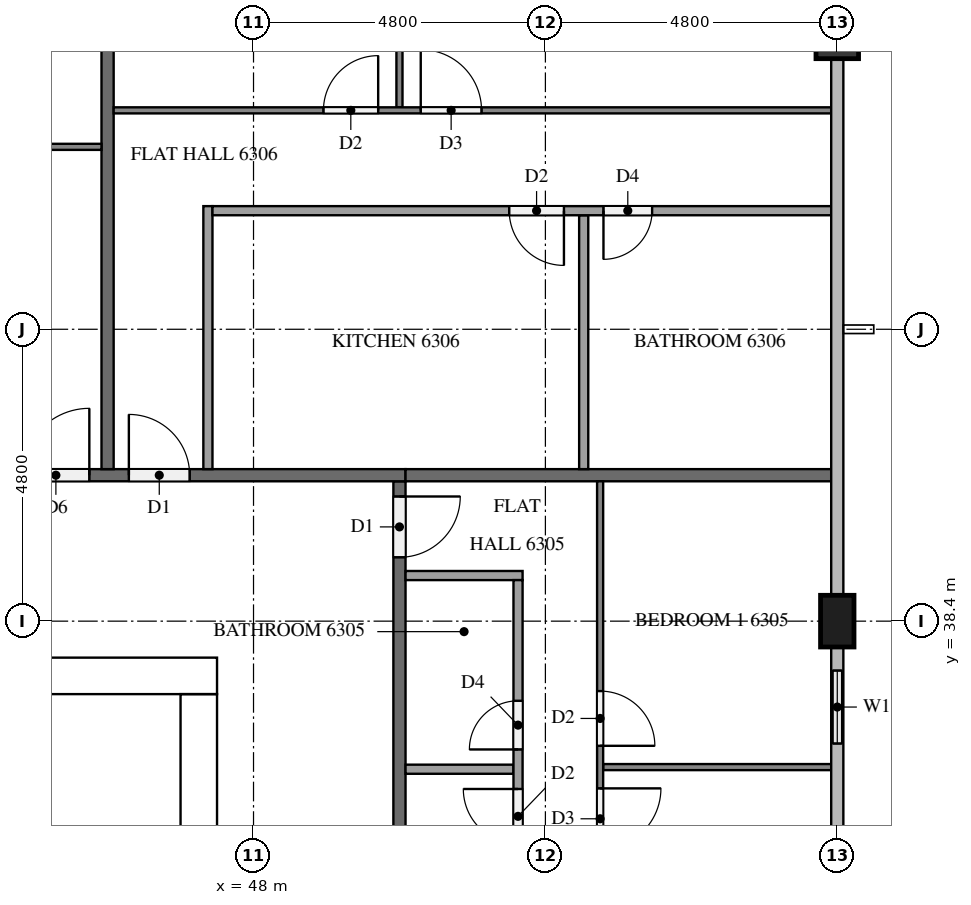
"""IFC4 building model, lengths in metres.
Left out: names, types, materials, properties, quantities, classifications, styles, units other than length and angle.
Written with IfcOpenShell. Run it as: python <this file> out.ifc"""

import sys

from ifc_helpers import new_model, si_unit, direction, frame, frame_2d, origin, origin_2d, place, context, subcontext, project, spatial, rectangle, extrude, element, fill, save


model = new_model("IFC4")
c1 = context("Model", 3, precision=1e-05, world=origin(), true_north=direction((0.0, 1.0)))
c2 = subcontext(c1, "Body", "Model", "MODEL_VIEW")
j1 = project(units=[si_unit("LENGTHUNIT", "METRE"), si_unit("PLANEANGLEUNIT", "RADIAN")], contexts=[c1])
p1 = place(None, origin())
s1 = spatial("IfcSite", under=j1, at=p1, CompositionType="ELEMENT")
p2 = place(p1, origin())
s2 = spatial("IfcBuilding", under=s1, at=p2, CompositionType="ELEMENT")
p3 = place(p2, frame((0.0, 0.0, 242.2)))
s3 = spatial("IfcBuildingStorey", under=s2, at=p3, CompositionType="ELEMENT", Elevation=242.2)
p4 = place(p3, frame((15.0, 37.5, 0.0), z_axis=(0.0, 0.0, 1.0), x_axis=(1.0, 0.0, 0.0)))
e1 = element("IfcWall", 1, at=p4, inside=s3, PredefinedType="SHEAR", context=c2, shape_type="SweptSolid", body=[
    extrude(rectangle(XDim=32.4, YDim=0.6, at=frame_2d((16.2, 0.0))), origin(), (0.0, 0.0, 1.0), 3.2),
])
p5 = place(p4, frame((15.3, 0.0, 0.0)))
e2 = element("IfcOpeningElement", 2, at=p5, cuts=e1, PredefinedType="OPENING", context=c2, shape_type="SweptSolid", body=[
    extrude(rectangle(XDim=1.8, YDim=2.1, at=frame_2d((0.9, 1.05))), frame((0.0, 0.31, 0.0), z_axis=(0.0, -1.0, 0.0), x_axis=(1.0, 0.0, 0.0)), (0.0, 0.0, 1.0), 0.62),
])
p6 = place(p4, frame((1.25, 0.0, 0.0)))
e3 = element("IfcOpeningElement", 3, at=p6, cuts=e1, PredefinedType="OPENING", context=c2, shape_type="SweptSolid", body=[
    extrude(rectangle(XDim=1.0, YDim=2.1, at=frame_2d((0.5, 1.05))), frame((0.0, 0.31, 0.0), z_axis=(0.0, -1.0, 0.0), x_axis=(1.0, 0.0, 0.0)), (0.0, 0.0, 1.0), 0.62),
])
p7 = place(p4, frame((4.988, 0.0, 0.0)))
e4 = element("IfcOpeningElement", 4, at=p7, cuts=e1, PredefinedType="OPENING", context=c2, shape_type="SweptSolid", body=[
    extrude(rectangle(XDim=1.0, YDim=2.1, at=frame_2d((0.5, 1.05))), frame((0.0, 0.31, 0.0), z_axis=(0.0, -1.0, 0.0), x_axis=(1.0, 0.0, 0.0)), (0.0, 0.0, 1.0), 0.62),
])
p8 = place(p3, frame((47.1, 15.6, 0.0), z_axis=(0.0, 0.0, 1.0), x_axis=(0.0, 1.0, 0.0)))
e5 = element("IfcWall", 5, at=p8, inside=s3, PredefinedType="SHEAR", context=c2, shape_type="SweptSolid", body=[
    extrude(rectangle(XDim=21.6, YDim=0.6, at=frame_2d((10.8, 0.0))), origin(), (0.0, 0.0, 1.0), 3.2),
])
p9 = place(p8, frame((10.5, 0.0, 0.0)))
e6 = element("IfcOpeningElement", 6, at=p9, cuts=e5, PredefinedType="OPENING", context=c2, shape_type="SweptSolid", body=[
    extrude(rectangle(XDim=1.2, YDim=2.1, at=frame_2d((0.6, 1.05))), frame((0.0, 0.31, 0.0), z_axis=(0.0, -1.0, 0.0), x_axis=(1.0, 0.0, 0.0)), (0.0, 0.0, 1.0), 0.62),
])
p10 = place(p3, frame((57.6, 38.4, 0.0), z_axis=(0.0, 0.0, 1.0), x_axis=(0.0, 1.0, 0.0)))
e7 = element("IfcColumn", 7, at=p10, inside=s3, PredefinedType="COLUMN", context=c2, shape_type="SweptSolid", body=[
    extrude(rectangle(XDim=0.85, YDim=0.55, at=origin_2d()), origin(), (0.0, 0.0, 1.0), 3.2),
])
p11 = place(p3, frame((57.6, 48.0, 0.0), z_axis=(0.0, 0.0, 1.0), x_axis=(1.0, 0.0, 0.0)))
e8 = element("IfcColumn", 8, at=p11, inside=s3, PredefinedType="COLUMN", context=c2, shape_type="SweptSolid", body=[
    extrude(rectangle(XDim=0.7, YDim=0.7, at=origin_2d()), origin(), (0.0, 0.0, 1.0), 3.2),
])
p12 = place(p3, frame((57.6, 36.0, 0.0), z_axis=(0.0, 0.0, 1.0), x_axis=(0.0, 1.0, 0.0)))
e9 = element("IfcWall", 9, at=p12, inside=s3, PredefinedType="SOLIDWALL", context=c2, shape_type="SweptSolid", body=[
    extrude(rectangle(XDim=1.975, YDim=0.15, at=frame_2d((0.988, 0.0))), origin(), (0.0, 0.0, 1.0), 3.2),
])
p13 = place(p12, frame((0.387, 0.0, 0.9)))
e10 = element("IfcOpeningElement", 10, at=p13, cuts=e9, PredefinedType="OPENING", context=c2, shape_type="SweptSolid", body=[
    extrude(rectangle(XDim=1.2, YDim=1.4, at=frame_2d((0.6, 0.7))), frame((0.0, 0.085, 0.0), z_axis=(0.0, -1.0, 0.0), x_axis=(1.0, 0.0, 0.0)), (0.0, 0.0, 1.0), 0.17),
])
p14 = place(p3, frame((50.4, 40.7, 0.0), z_axis=(0.0, 0.0, 1.0), x_axis=(0.0, -1.0, 0.0)))
e11 = element("IfcWall", 11, at=p14, inside=s3, PredefinedType="PARTITIONING", context=c2, shape_type="SweptSolid", body=[
    extrude(rectangle(XDim=28.6, YDim=0.2, at=frame_2d((14.3, 0.0))), origin(), (0.0, 0.0, 1.0), 3.2),
])
p15 = place(p14, frame((27.3, 0.0, 0.0)))
e12 = element("IfcOpeningElement", 12, at=p15, cuts=e11, PredefinedType="OPENING", context=c2, shape_type="SweptSolid", body=[
    extrude(rectangle(XDim=1.1, YDim=2.1, at=frame_2d((0.55, 1.05))), frame((0.0, 0.11, 0.0), z_axis=(0.0, -1.0, 0.0), x_axis=(1.0, 0.0, 0.0)), (0.0, 0.0, 1.0), 0.22),
])
p16 = place(p14, frame((0.25, 0.0, 0.0)))
e13 = element("IfcOpeningElement", 13, at=p16, cuts=e11, PredefinedType="OPENING", context=c2, shape_type="SweptSolid", body=[
    extrude(rectangle(XDim=1.0, YDim=2.1, at=frame_2d((0.5, 1.05))), frame((0.0, 0.11, 0.0), z_axis=(0.0, -1.0, 0.0), x_axis=(1.0, 0.0, 0.0)), (0.0, 0.0, 1.0), 0.22),
])
p17 = place(p3, frame((11.9, 40.8, 0.0), z_axis=(0.0, 0.0, 1.0), x_axis=(1.0, 0.0, 0.0)))
e14 = element("IfcWall", 14, at=p17, inside=s3, PredefinedType="PARTITIONING", context=c2, shape_type="SweptSolid", body=[
    extrude(rectangle(XDim=38.6, YDim=0.2, at=frame_2d((19.3, 0.0))), origin(), (0.0, 0.0, 1.0), 3.2),
])
p18 = place(p17, frame((34.05, 0.0, 0.0)))
e15 = element("IfcOpeningElement", 15, at=p18, cuts=e14, PredefinedType="OPENING", context=c2, shape_type="SweptSolid", body=[
    extrude(rectangle(XDim=1.0, YDim=2.1, at=frame_2d((0.5, 1.05))), frame((0.0, 0.11, 0.0), z_axis=(0.0, -1.0, 0.0), x_axis=(1.0, 0.0, 0.0)), (0.0, 0.0, 1.0), 0.22),
])
p19 = place(p17, frame((32.3, 0.0, 0.0)))
e16 = element("IfcOpeningElement", 16, at=p19, cuts=e14, PredefinedType="OPENING", context=c2, shape_type="SweptSolid", body=[
    extrude(rectangle(XDim=1.1, YDim=2.1, at=frame_2d((0.55, 1.05))), frame((0.0, 0.11, 0.0), z_axis=(0.0, -1.0, 0.0), x_axis=(1.0, 0.0, 0.0)), (0.0, 0.0, 1.0), 0.22),
])
p20 = place(p17, frame((2.85, 0.0, 0.0)))
e17 = element("IfcOpeningElement", 17, at=p20, cuts=e14, PredefinedType="OPENING", context=c2, shape_type="SweptSolid", body=[
    extrude(rectangle(XDim=1.0, YDim=2.1, at=frame_2d((0.5, 1.05))), frame((0.0, 0.11, 0.0), z_axis=(0.0, -1.0, 0.0), x_axis=(1.0, 0.0, 0.0)), (0.0, 0.0, 1.0), 0.22),
])
p21 = place(p17, frame((1.15, 0.0, 0.0)))
e18 = element("IfcOpeningElement", 18, at=p21, cuts=e14, PredefinedType="OPENING", context=c2, shape_type="SweptSolid", body=[
    extrude(rectangle(XDim=1.0, YDim=2.1, at=frame_2d((0.5, 1.05))), frame((0.0, 0.11, 0.0), z_axis=(0.0, -1.0, 0.0), x_axis=(1.0, 0.0, 0.0)), (0.0, 0.0, 1.0), 0.22),
])
p22 = place(p3, frame((50.5, 40.8, 0.0), z_axis=(0.0, 0.0, 1.0), x_axis=(1.0, 0.0, 0.0)))
e19 = element("IfcWall", 19, at=p22, inside=s3, PredefinedType="PARTITIONING", context=c2, shape_type="SweptSolid", body=[
    extrude(rectangle(XDim=7.0, YDim=0.2, at=frame_2d((3.5, 0.0))), origin(), (0.0, 0.0, 1.0), 3.2),
])
p23 = place(p3, frame((45.6, 52.7, 0.0), z_axis=(0.0, 0.0, 1.0), x_axis=(0.0, -1.0, 0.0)))
e20 = element("IfcWall", 20, at=p23, inside=s3, PredefinedType="PARTITIONING", context=c2, shape_type="SweptSolid", body=[
    extrude(rectangle(XDim=11.8, YDim=0.2, at=frame_2d((5.9, 0.0))), origin(), (0.0, 0.0, 1.0), 3.2),
])
p24 = place(p3, frame((53.75, 36.0, 0.0), z_axis=(0.0, 0.0, 1.0), x_axis=(1.0, 0.0, 0.0)))
e21 = element("IfcWall", 21, at=p24, inside=s3, PredefinedType="PARTITIONING", context=c2, shape_type="SweptSolid", body=[
    extrude(rectangle(XDim=3.75, YDim=0.1, at=frame_2d((1.875, 0.0))), origin(), (0.0, 0.0, 1.0), 3.2),
])
p25 = place(p3, frame((53.7, 40.7, 0.0), z_axis=(0.0, 0.0, 1.0), x_axis=(0.0, -1.0, 0.0)))
e22 = element("IfcWall", 22, at=p25, inside=s3, PredefinedType="PARTITIONING", context=c2, shape_type="SweptSolid", body=[
    extrude(rectangle(XDim=9.4, YDim=0.1, at=frame_2d((4.7, 0.0))), origin(), (0.0, 0.0, 1.0), 3.2),
])
p26 = place(p25, frame((3.45, 0.0, 0.0)))
e23 = element("IfcOpeningElement", 23, at=p26, cuts=e22, PredefinedType="OPENING", context=c2, shape_type="SweptSolid", body=[
    extrude(rectangle(XDim=0.9, YDim=2.1, at=frame_2d((0.45, 1.05))), frame((0.0, 0.06, 0.0), z_axis=(0.0, -1.0, 0.0), x_axis=(1.0, 0.0, 0.0)), (0.0, 0.0, 1.0), 0.12),
])
p27 = place(p25, frame((5.05, 0.0, 0.0)))
e24 = element("IfcOpeningElement", 24, at=p27, cuts=e22, PredefinedType="OPENING", context=c2, shape_type="SweptSolid", body=[
    extrude(rectangle(XDim=1.0, YDim=2.1, at=frame_2d((0.5, 1.05))), frame((0.0, 0.06, 0.0), z_axis=(0.0, -1.0, 0.0), x_axis=(1.0, 0.0, 0.0)), (0.0, 0.0, 1.0), 0.12),
])
p28 = place(p3, frame((50.5, 35.965, 0.0), z_axis=(0.0, 0.0, 1.0), x_axis=(1.0, 0.0, 0.0)))
e25 = element("IfcWall", 25, at=p28, inside=s3, PredefinedType="PARTITIONING", context=c2, shape_type="SweptSolid", body=[
    extrude(rectangle(XDim=1.775, YDim=0.15, at=frame_2d((0.887, 0.0))), origin(), (0.0, 0.0, 1.0), 3.2),
])
p29 = place(p3, frame((50.5, 39.15, 0.0), z_axis=(0.0, 0.0, 1.0), x_axis=(1.0, 0.0, 0.0)))
e26 = element("IfcWall", 26, at=p29, inside=s3, PredefinedType="PARTITIONING", context=c2, shape_type="SweptSolid", body=[
    extrude(rectangle(XDim=1.925, YDim=0.15, at=frame_2d((0.962, 0.0))), origin(), (0.0, 0.0, 1.0), 3.2),
])
p30 = place(p3, frame((52.35, 31.3, 0.0), z_axis=(0.0, 0.0, 1.0), x_axis=(0.0, 1.0, 0.0)))
e27 = element("IfcWall", 27, at=p30, inside=s3, PredefinedType="PARTITIONING", context=c2, shape_type="SweptSolid", body=[
    extrude(rectangle(XDim=7.775, YDim=0.15, at=frame_2d((3.887, 0.0))), origin(), (0.0, 0.0, 1.0), 3.2),
])
p31 = place(p30, frame((4.99, 0.0, 0.0)))
e28 = element("IfcOpeningElement", 28, at=p31, cuts=e27, PredefinedType="OPENING", context=c2, shape_type="SweptSolid", body=[
    extrude(rectangle(XDim=0.8, YDim=2.1, at=frame_2d((0.4, 1.05))), frame((0.0, 0.085, 0.0), z_axis=(0.0, -1.0, 0.0), x_axis=(1.0, 0.0, 0.0)), (0.0, 0.0, 1.0), 0.17),
])
p32 = place(p30, frame((3.44, 0.0, 0.0)))
e29 = element("IfcOpeningElement", 29, at=p32, cuts=e27, PredefinedType="OPENING", context=c2, shape_type="SweptSolid", body=[
    extrude(rectangle(XDim=0.9, YDim=2.1, at=frame_2d((0.45, 1.05))), frame((0.0, 0.085, 0.0), z_axis=(0.0, -1.0, 0.0), x_axis=(1.0, 0.0, 0.0)), (0.0, 0.0, 1.0), 0.17),
])
p33 = place(p3, frame((50.4, 46.85, 0.0), z_axis=(0.0, 0.0, 1.0), x_axis=(0.0, 1.0, 0.0)))
e30 = element("IfcWall", 30, at=p33, inside=s3, PredefinedType="PARTITIONING", context=c2, shape_type="SweptSolid", body=[
    extrude(rectangle(XDim=5.85, YDim=0.1, at=frame_2d((2.925, 0.0))), origin(), (0.0, 0.0, 1.0), 3.2),
])
p34 = place(p3, frame((45.7, 46.8, 0.0), z_axis=(0.0, 0.0, 1.0), x_axis=(1.0, 0.0, 0.0)))
e31 = element("IfcWall", 31, at=p34, inside=s3, PredefinedType="PARTITIONING", context=c2, shape_type="SweptSolid", body=[
    extrude(rectangle(XDim=11.8, YDim=0.1, at=frame_2d((5.9, 0.0))), origin(), (0.0, 0.0, 1.0), 3.2),
])
p35 = place(p34, frame((3.45, 0.0, 0.0)))
e32 = element("IfcOpeningElement", 32, at=p35, cuts=e31, PredefinedType="OPENING", context=c2, shape_type="SweptSolid", body=[
    extrude(rectangle(XDim=0.9, YDim=2.1, at=frame_2d((0.45, 1.05))), frame((0.0, 0.06, 0.0), z_axis=(0.0, -1.0, 0.0), x_axis=(1.0, 0.0, 0.0)), (0.0, 0.0, 1.0), 0.12),
])
p36 = place(p34, frame((5.05, 0.0, 0.0)))
e33 = element("IfcOpeningElement", 33, at=p36, cuts=e31, PredefinedType="OPENING", context=c2, shape_type="SweptSolid", body=[
    extrude(rectangle(XDim=1.0, YDim=2.1, at=frame_2d((0.5, 1.05))), frame((0.0, 0.06, 0.0), z_axis=(0.0, -1.0, 0.0), x_axis=(1.0, 0.0, 0.0)), (0.0, 0.0, 1.0), 0.12),
])
p37 = place(p3, frame((53.43, 40.9, 0.0), z_axis=(0.0, 0.0, 1.0), x_axis=(0.0, 1.0, 0.0)))
e34 = element("IfcWall", 34, at=p37, inside=s3, PredefinedType="PARTITIONING", context=c2, shape_type="SweptSolid", body=[
    extrude(rectangle(XDim=4.175, YDim=0.15, at=frame_2d((2.087, 0.0))), origin(), (0.0, 0.0, 1.0), 3.2),
])
p38 = place(p3, frame((47.25, 40.9, 0.0), z_axis=(0.0, 0.0, 1.0), x_axis=(0.0, 1.0, 0.0)))
e35 = element("IfcWall", 35, at=p38, inside=s3, PredefinedType="PARTITIONING", context=c2, shape_type="SweptSolid", body=[
    extrude(rectangle(XDim=4.325, YDim=0.15, at=frame_2d((2.163, 0.0))), origin(), (0.0, 0.0, 1.0), 3.2),
])
p39 = place(p3, frame((57.5, 45.15, 0.0), z_axis=(0.0, 0.0, 1.0), x_axis=(-1.0, 0.0, 0.0)))
e36 = element("IfcWall", 36, at=p39, inside=s3, PredefinedType="PARTITIONING", context=c2, shape_type="SweptSolid", body=[
    extrude(rectangle(XDim=10.175, YDim=0.15, at=frame_2d((5.087, 0.0))), origin(), (0.0, 0.0, 1.0), 3.2),
])
p40 = place(p39, frame((4.395, 0.0, 0.0)))
e37 = element("IfcOpeningElement", 37, at=p40, cuts=e36, PredefinedType="OPENING", context=c2, shape_type="SweptSolid", body=[
    extrude(rectangle(XDim=0.9, YDim=2.1, at=frame_2d((0.45, 1.05))), frame((0.0, 0.085, 0.0), z_axis=(0.0, -1.0, 0.0), x_axis=(1.0, 0.0, 0.0)), (0.0, 0.0, 1.0), 0.17),
])
p41 = place(p39, frame((2.945, 0.0, 0.0)))
e38 = element("IfcOpeningElement", 38, at=p41, cuts=e36, PredefinedType="OPENING", context=c2, shape_type="SweptSolid", body=[
    extrude(rectangle(XDim=0.8, YDim=2.1, at=frame_2d((0.4, 1.05))), frame((0.0, 0.085, 0.0), z_axis=(0.0, -1.0, 0.0), x_axis=(1.0, 0.0, 0.0)), (0.0, 0.0, 1.0), 0.17),
])
p42 = place(p3, frame((26.5, 46.2, 0.0), z_axis=(0.0, 0.0, 1.0), x_axis=(1.0, 0.0, 0.0)))
e39 = element("IfcWall", 39, at=p42, inside=s3, PredefinedType="PARTITIONING", context=c2, shape_type="SweptSolid", body=[
    extrude(rectangle(XDim=19.0, YDim=0.1, at=frame_2d((9.5, 0.0))), origin(), (0.0, 0.0, 1.0), 3.2),
])
p43 = place(p42, frame((14.65, 0.0, 0.0)))
e40 = element("IfcOpeningElement", 40, at=p43, cuts=e39, PredefinedType="OPENING", context=c2, shape_type="SweptSolid", body=[
    extrude(rectangle(XDim=0.9, YDim=2.1, at=frame_2d((0.45, 1.05))), frame((0.0, 0.06, 0.0), z_axis=(0.0, -1.0, 0.0), x_axis=(1.0, 0.0, 0.0)), (0.0, 0.0, 1.0), 0.12),
])
p44 = place(p42, frame((13.05, 0.0, 0.0)))
e41 = element("IfcOpeningElement", 41, at=p44, cuts=e39, PredefinedType="OPENING", context=c2, shape_type="SweptSolid", body=[
    extrude(rectangle(XDim=0.9, YDim=2.1, at=frame_2d((0.45, 1.05))), frame((0.0, 0.06, 0.0), z_axis=(0.0, -1.0, 0.0), x_axis=(1.0, 0.0, 0.0)), (0.0, 0.0, 1.0), 0.12),
])
p45 = place(p42, frame((5.05, 0.0, 0.0)))
e42 = element("IfcOpeningElement", 42, at=p45, cuts=e39, PredefinedType="OPENING", context=c2, shape_type="SweptSolid", body=[
    extrude(rectangle(XDim=0.9, YDim=2.1, at=frame_2d((0.45, 1.05))), frame((0.0, 0.06, 0.0), z_axis=(0.0, -1.0, 0.0), x_axis=(1.0, 0.0, 0.0)), (0.0, 0.0, 1.0), 0.12),
])
p46 = place(p42, frame((3.35, 0.0, 0.0)))
e43 = element("IfcOpeningElement", 43, at=p46, cuts=e39, PredefinedType="OPENING", context=c2, shape_type="SweptSolid", body=[
    extrude(rectangle(XDim=1.0, YDim=2.1, at=frame_2d((0.5, 1.05))), frame((0.0, 0.06, 0.0), z_axis=(0.0, -1.0, 0.0), x_axis=(1.0, 0.0, 0.0)), (0.0, 0.0, 1.0), 0.12),
])
p47 = place(p13, origin())
e44 = element("IfcWindow", 44, at=p47, inside=s3, PartitioningType="SINGLE_PANEL", PredefinedType="WINDOW", context=c2, shape_type="SweptSolid", body=[
    extrude(rectangle(XDim=1.2, YDim=1.4, at=frame_2d((0.6, 0.7))), frame((0.0, 0.03, 0.0), z_axis=(0.0, -1.0, 0.0), x_axis=(1.0, 0.0, 0.0)), (0.0, 0.0, 1.0), 0.06),
])
fill(e10, e44)
p48 = place(p16, origin())
e45 = element("IfcDoor", 45, at=p48, inside=s3, OperationType="SINGLE_SWING_LEFT", PredefinedType="DOOR", context=c2, shape_type="SweptSolid", body=[
    extrude(rectangle(XDim=1.0, YDim=2.1, at=frame_2d((0.5, 1.05))), frame((0.0, 0.025, 0.0), z_axis=(0.0, -1.0, 0.0), x_axis=(1.0, 0.0, 0.0)), (0.0, 0.0, 1.0), 0.05),
])
fill(e13, e45)
p49 = place(p18, origin())
e46 = element("IfcDoor", 46, at=p49, inside=s3, OperationType="SINGLE_SWING_LEFT", PredefinedType="DOOR", context=c2, shape_type="SweptSolid", body=[
    extrude(rectangle(XDim=1.0, YDim=2.1, at=frame_2d((0.5, 1.05))), frame((0.0, 0.025, 0.0), z_axis=(0.0, -1.0, 0.0), x_axis=(1.0, 0.0, 0.0)), (0.0, 0.0, 1.0), 0.05),
])
fill(e15, e46)
p50 = place(p19, origin())
e47 = element("IfcDoor", 47, at=p50, inside=s3, OperationType="SINGLE_SWING_RIGHT", PredefinedType="DOOR", context=c2, shape_type="SweptSolid", body=[
    extrude(rectangle(XDim=1.1, YDim=2.1, at=frame_2d((0.55, 1.05))), frame((0.0, 0.025, 0.0), z_axis=(0.0, -1.0, 0.0), x_axis=(1.0, 0.0, 0.0)), (0.0, 0.0, 1.0), 0.05),
])
fill(e16, e47)
p51 = place(p26, origin())
e48 = element("IfcDoor", 48, at=p51, inside=s3, OperationType="SINGLE_SWING_RIGHT", PredefinedType="DOOR", context=c2, shape_type="SweptSolid", body=[
    extrude(rectangle(XDim=0.9, YDim=2.1, at=frame_2d((0.45, 1.05))), frame((0.0, 0.025, 0.0), z_axis=(0.0, -1.0, 0.0), x_axis=(1.0, 0.0, 0.0)), (0.0, 0.0, 1.0), 0.05),
])
fill(e23, e48)
p52 = place(p27, origin())
e49 = element("IfcDoor", 49, at=p52, inside=s3, OperationType="SINGLE_SWING_LEFT", PredefinedType="DOOR", context=c2, shape_type="SweptSolid", body=[
    extrude(rectangle(XDim=1.0, YDim=2.1, at=frame_2d((0.5, 1.05))), frame((0.0, 0.025, 0.0), z_axis=(0.0, -1.0, 0.0), x_axis=(1.0, 0.0, 0.0)), (0.0, 0.0, 1.0), 0.05),
])
fill(e24, e49)
p53 = place(p31, origin())
e50 = element("IfcDoor", 50, at=p53, inside=s3, OperationType="SINGLE_SWING_LEFT", PredefinedType="DOOR", context=c2, shape_type="SweptSolid", body=[
    extrude(rectangle(XDim=0.8, YDim=2.1, at=frame_2d((0.4, 1.05))), frame((0.0, 0.025, 0.0), z_axis=(0.0, -1.0, 0.0), x_axis=(1.0, 0.0, 0.0)), (0.0, 0.0, 1.0), 0.05),
])
fill(e28, e50)
p54 = place(p32, origin())
e51 = element("IfcDoor", 51, at=p54, inside=s3, OperationType="SINGLE_SWING_RIGHT", PredefinedType="DOOR", context=c2, shape_type="SweptSolid", body=[
    extrude(rectangle(XDim=0.9, YDim=2.1, at=frame_2d((0.45, 1.05))), frame((0.0, 0.025, 0.0), z_axis=(0.0, -1.0, 0.0), x_axis=(1.0, 0.0, 0.0)), (0.0, 0.0, 1.0), 0.05),
])
fill(e29, e51)
p55 = place(p35, origin())
e52 = element("IfcDoor", 52, at=p55, inside=s3, OperationType="SINGLE_SWING_RIGHT", PredefinedType="DOOR", context=c2, shape_type="SweptSolid", body=[
    extrude(rectangle(XDim=0.9, YDim=2.1, at=frame_2d((0.45, 1.05))), frame((0.0, 0.025, 0.0), z_axis=(0.0, -1.0, 0.0), x_axis=(1.0, 0.0, 0.0)), (0.0, 0.0, 1.0), 0.05),
])
fill(e32, e52)
p56 = place(p36, origin())
e53 = element("IfcDoor", 53, at=p56, inside=s3, OperationType="SINGLE_SWING_LEFT", PredefinedType="DOOR", context=c2, shape_type="SweptSolid", body=[
    extrude(rectangle(XDim=1.0, YDim=2.1, at=frame_2d((0.5, 1.05))), frame((0.0, 0.025, 0.0), z_axis=(0.0, -1.0, 0.0), x_axis=(1.0, 0.0, 0.0)), (0.0, 0.0, 1.0), 0.05),
])
fill(e33, e53)
p57 = place(p40, origin())
e54 = element("IfcDoor", 54, at=p57, inside=s3, OperationType="SINGLE_SWING_LEFT", PredefinedType="DOOR", context=c2, shape_type="SweptSolid", body=[
    extrude(rectangle(XDim=0.9, YDim=2.1, at=frame_2d((0.45, 1.05))), frame((0.0, 0.025, 0.0), z_axis=(0.0, -1.0, 0.0), x_axis=(1.0, 0.0, 0.0)), (0.0, 0.0, 1.0), 0.05),
])
fill(e37, e54)
p58 = place(p41, origin())
e55 = element("IfcDoor", 55, at=p58, inside=s3, OperationType="SINGLE_SWING_RIGHT", PredefinedType="DOOR", context=c2, shape_type="SweptSolid", body=[
    extrude(rectangle(XDim=0.8, YDim=2.1, at=frame_2d((0.4, 1.05))), frame((0.0, 0.025, 0.0), z_axis=(0.0, -1.0, 0.0), x_axis=(1.0, 0.0, 0.0)), (0.0, 0.0, 1.0), 0.05),
])
fill(e38, e55)
save(model, sys.argv[1])
